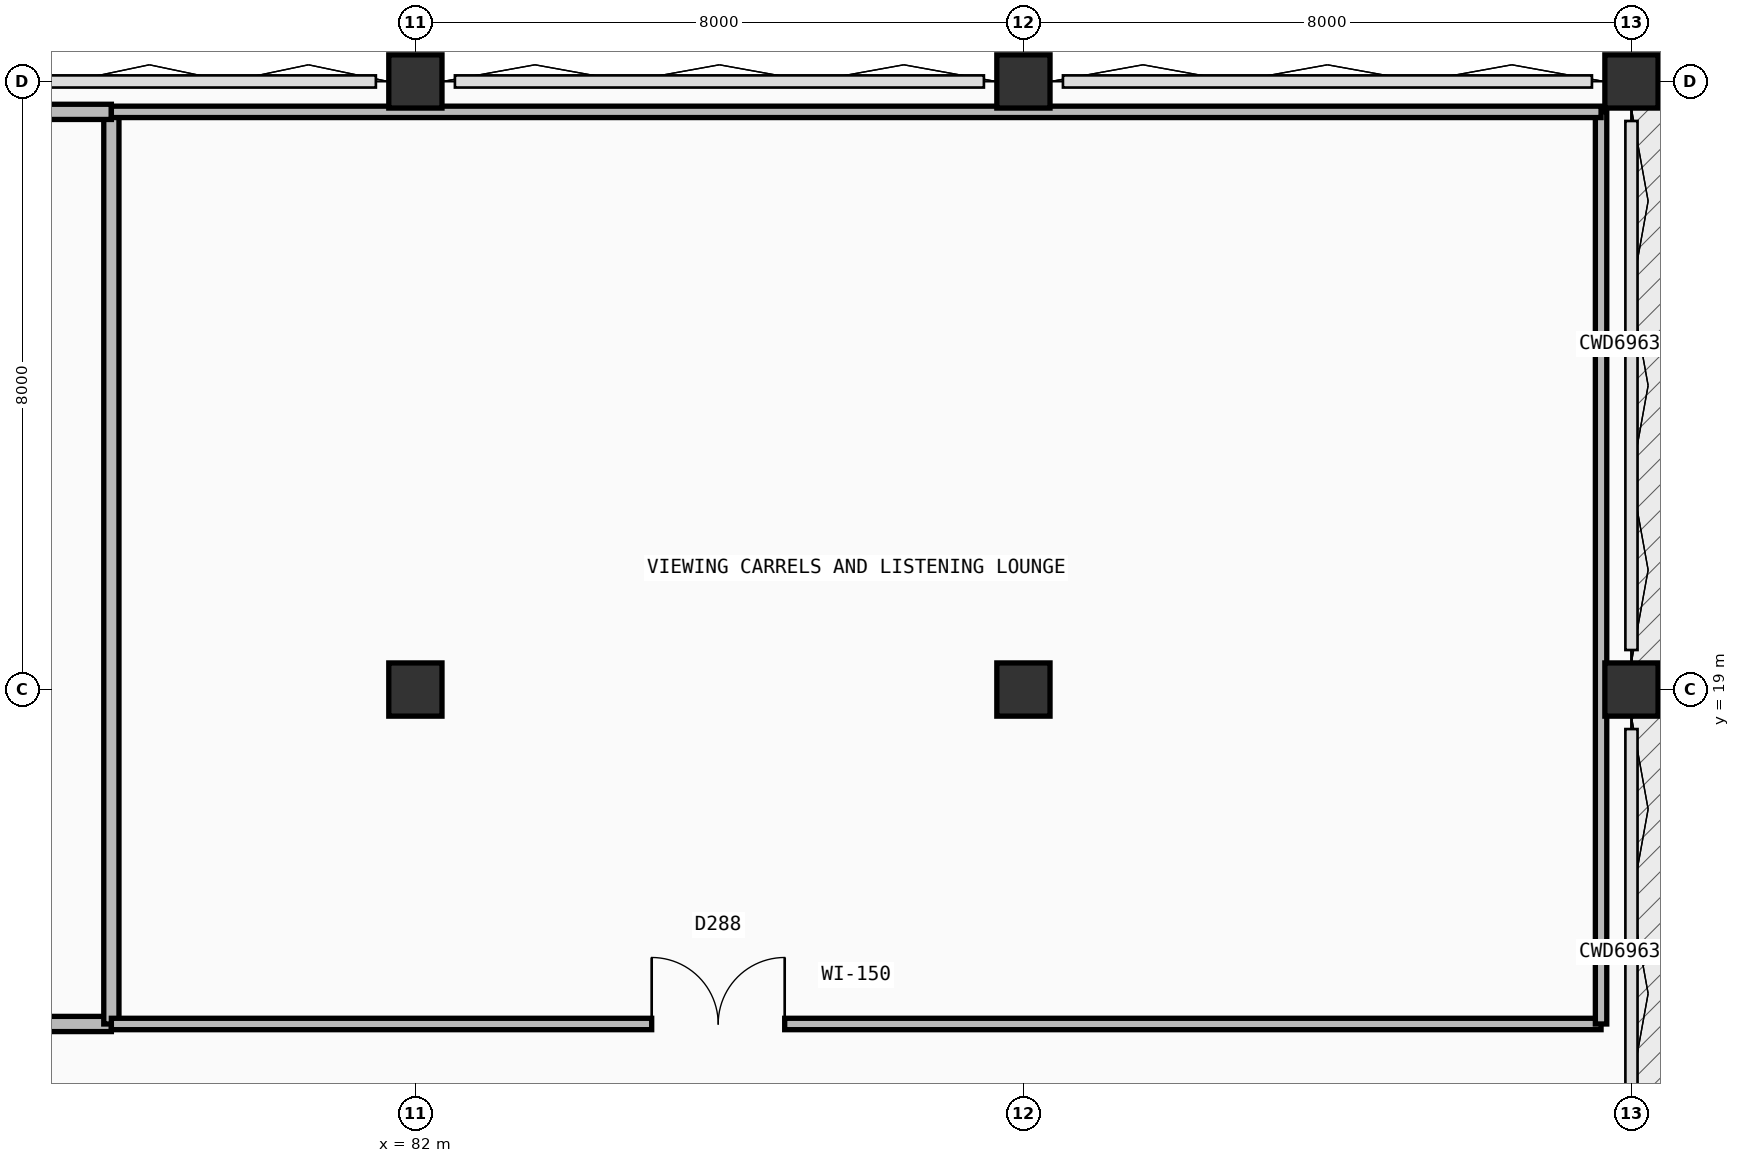
"""IFC4 building model, lengths in metres.
Left out: names, types, materials, properties, quantities, classifications, styles, units other than length and angle.
Written with IfcOpenShell. Run it as: python <this file> out.ifc"""

import sys

from ifc_helpers import new_model, si_unit, direction, frame, frame_2d, origin, origin_2d, place, context, subcontext, project, spatial, rectangle, extrude, element, fill, save


model = new_model("IFC4")
c1 = context("Model", 3, precision=1e-05, world=origin(), true_north=direction((0.0, 1.0)))
c2 = subcontext(c1, "Body", "Model", "MODEL_VIEW")
j1 = project(units=[si_unit("LENGTHUNIT", "METRE"), si_unit("PLANEANGLEUNIT", "RADIAN")], contexts=[c1])
p1 = place(None, origin())
s1 = spatial("IfcSite", under=j1, at=p1, CompositionType="ELEMENT")
p2 = place(p1, origin())
s2 = spatial("IfcBuilding", under=s1, at=p2, CompositionType="ELEMENT")
p3 = place(p2, frame((0.0, 0.0, 14.4)))
s3 = spatial("IfcBuildingStorey", under=s2, at=p3, CompositionType="ELEMENT", Elevation=14.4)
for number, where, z_axis, x_axis in (
    (1, (82.0, 19.0, 0.0), (0.0, 0.0, 1.0), (1.0, 0.0, 0.0)),
    (2, (82.0, 27.0, 0.0), (0.0, 0.0, 1.0), (1.0, 0.0, 0.0)),
    (3, (90.0, 19.0, 0.0), (0.0, 0.0, 1.0), (1.0, 0.0, 0.0)),
    (4, (90.0, 27.0, 0.0), (0.0, 0.0, 1.0), (1.0, 0.0, 0.0)),
    (5, (98.0, 19.0, 0.0), (0.0, 0.0, 1.0), (1.0, 0.0, 0.0)),
    (6, (98.0, 27.0, 0.0), (0.0, 0.0, 1.0), (1.0, 0.0, 0.0)),
):
    element("IfcColumn", number, at=place(p3, frame(where, z_axis=z_axis, x_axis=x_axis)), inside=s3, PredefinedType="COLUMN", context=c2, shape_type="SweptSolid", body=[
        extrude(rectangle(XDim=0.7, YDim=0.7, at=origin_2d()), origin(), (0.0, 0.0, 1.0), 4.5),
    ])
p4 = place(p3, frame((57.4, 14.6, 0.0), z_axis=(0.0, 0.0, 1.0), x_axis=(1.0, 0.0, 0.0)))
e7 = element("IfcWall", 7, at=p4, inside=s3, PredefinedType="PARTITIONING", context=c2, shape_type="SweptSolid", body=[
    extrude(rectangle(XDim=20.6, YDim=0.2, at=frame_2d((10.3, 0.0))), origin(), (0.0, 0.0, 1.0), 4.2),
])
p5 = place(p4, frame((12.803, 0.0, 0.0)))
e8 = element("IfcOpeningElement", 8, at=p5, cuts=e7, PredefinedType="OPENING", context=c2, shape_type="SweptSolid", body=[
    extrude(rectangle(XDim=1.65, YDim=2.25, at=frame_2d((0.825, 1.125))), frame((0.0, 0.11, 0.0), z_axis=(0.0, -1.0, 0.0), x_axis=(1.0, 0.0, 0.0)), (0.0, 0.0, 1.0), 0.22),
])
p6 = place(p3, frame((78.0, 14.6, 0.0), z_axis=(0.0, 0.0, 1.0), x_axis=(0.0, 1.0, 0.0)))
e9 = element("IfcWall", 9, at=p6, inside=s3, PredefinedType="PARTITIONING", context=c2, shape_type="SweptSolid", body=[
    extrude(rectangle(XDim=12.0, YDim=0.2, at=frame_2d((6.0, 0.0))), origin(), (0.0, 0.0, 1.0), 3.705),
])
p7 = place(p3, frame((57.4, 26.6, 0.0), z_axis=(0.0, 0.0, 1.0), x_axis=(1.0, 0.0, 0.0)))
e10 = element("IfcWall", 10, at=p7, inside=s3, PredefinedType="PARTITIONING", context=c2, shape_type="SweptSolid", body=[
    extrude(rectangle(XDim=20.6, YDim=0.2, at=frame_2d((10.3, 0.0))), origin(), (0.0, 0.0, 1.0), 3.605),
])
p8 = place(p3, frame((78.0, 14.6, 0.0), z_axis=(0.0, 0.0, 1.0), x_axis=(1.0, 0.0, 0.0)))
e11 = element("IfcWall", 11, at=p8, inside=s3, PredefinedType="PARTITIONING", context=c2, shape_type="SweptSolid", body=[
    extrude(rectangle(XDim=19.6, YDim=0.15, at=frame_2d((9.8, 0.0))), origin(), (0.0, 0.0, 1.0), 4.2),
])
p9 = place(p8, frame((7.109, 0.0, 0.0)))
e12 = element("IfcOpeningElement", 12, at=p9, cuts=e11, PredefinedType="OPENING", context=c2, shape_type="SweptSolid", body=[
    extrude(rectangle(XDim=1.75, YDim=2.3, at=frame_2d((0.875, 1.15))), frame((0.0, 0.085, 0.0), z_axis=(0.0, -1.0, 0.0), x_axis=(1.0, 0.0, 0.0)), (0.0, 0.0, 1.0), 0.17),
])
p10 = place(p3, frame((97.6, 14.6, 0.0), z_axis=(0.0, 0.0, 1.0), x_axis=(0.0, 1.0, 0.0)))
e13 = element("IfcWall", 13, at=p10, inside=s3, PredefinedType="PARTITIONING", context=c2, shape_type="SweptSolid", body=[
    extrude(rectangle(XDim=12.0, YDim=0.15, at=frame_2d((6.0, 0.0))), origin(), (0.0, 0.0, 1.0), 3.605),
])
p11 = place(p3, frame((78.0, 26.6, 0.0), z_axis=(0.0, 0.0, 1.0), x_axis=(1.0, 0.0, 0.0)))
e14 = element("IfcWall", 14, at=p11, inside=s3, PredefinedType="PARTITIONING", context=c2, shape_type="SweptSolid", body=[
    extrude(rectangle(XDim=19.6, YDim=0.15, at=frame_2d((9.8, 0.0))), origin(), (0.0, 0.0, 1.0), 3.605),
])
p12 = place(p9, origin())
e15 = element("IfcDoor", 15, at=p12, inside=s3, OperationType="DOUBLE_DOOR_SINGLE_SWING", PredefinedType="DOOR", context=c2, shape_type="SweptSolid", body=[
    extrude(rectangle(XDim=1.75, YDim=2.3, at=frame_2d((0.875, 1.15))), frame((0.0, 0.025, 0.0), z_axis=(0.0, -1.0, 0.0), x_axis=(1.0, 0.0, 0.0)), (0.0, 0.0, 1.0), 0.05),
])
fill(e12, e15)
save(model, sys.argv[1])
